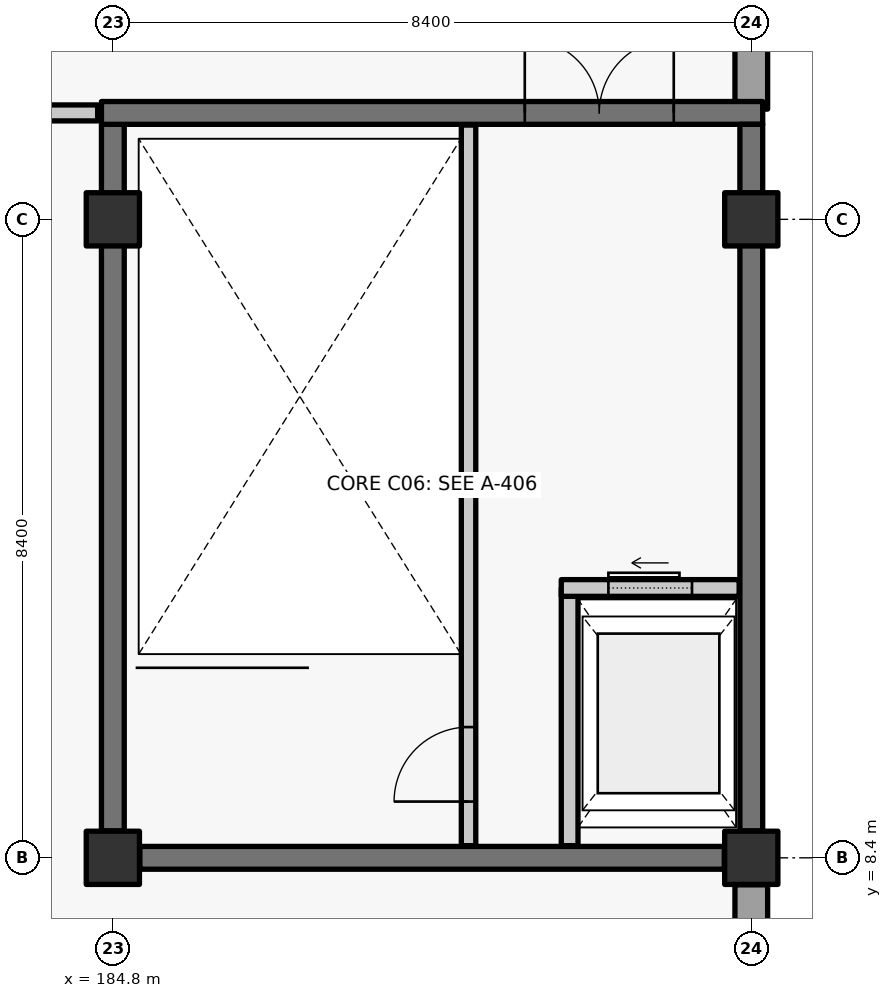
"""IFC4 building model, lengths in metres.
Left out: names, types, materials, properties, quantities, classifications, styles, units other than length and angle.
Written with IfcOpenShell. Run it as: python <this file> out.ifc"""

import sys

from ifc_helpers import new_model, si_unit, direction, frame, frame_2d, origin, origin_2d, place, context, subcontext, project, spatial, rectangle, extrude, element, fill, save


model = new_model("IFC4")
c1 = context("Model", 3, precision=1e-05, world=origin(), true_north=direction((0.0, 1.0)))
c2 = subcontext(c1, "Body", "Model", "MODEL_VIEW")
j1 = project(units=[si_unit("LENGTHUNIT", "METRE"), si_unit("PLANEANGLEUNIT", "RADIAN")], contexts=[c1])
p1 = place(None, origin())
s1 = spatial("IfcSite", under=j1, at=p1, CompositionType="ELEMENT")
p2 = place(p1, origin())
s2 = spatial("IfcBuilding", under=s1, at=p2, CompositionType="ELEMENT")
p3 = place(p2, frame((0.0, 0.0, 11.4)))
s3 = spatial("IfcBuildingStorey", under=s2, at=p3, CompositionType="ELEMENT", Elevation=11.4)
for number, where, z_axis, x_axis in (
    (1, (184.8, 8.4, 0.0), (0.0, 0.0, 1.0), (1.0, 0.0, 0.0)),
    (2, (184.8, 16.8, 0.0), (0.0, 0.0, 1.0), (1.0, 0.0, 0.0)),
    (3, (193.2, 8.4, 0.0), (0.0, 0.0, 1.0), (1.0, 0.0, 0.0)),
    (4, (193.2, 16.8, 0.0), (0.0, 0.0, 1.0), (1.0, 0.0, 0.0)),
):
    element("IfcColumn", number, at=place(p3, frame(where, z_axis=z_axis, x_axis=x_axis)), inside=s3, PredefinedType="COLUMN", context=c2, shape_type="SweptSolid", body=[
        extrude(rectangle(XDim=0.7, YDim=0.7, at=origin_2d()), origin(), (0.0, 0.0, 1.0), 4.8),
    ])
p4 = place(p3, frame((193.2, 8.045, 0.0), z_axis=(0.0, 0.0, 1.0), x_axis=(0.0, -1.0, 0.0)))
e5 = element("IfcWall", 5, at=p4, inside=s3, PredefinedType="SOLIDWALL", context=c2, shape_type="SweptSolid", body=[
    extrude(rectangle(XDim=7.69, YDim=0.43, at=frame_2d((3.845, 0.0))), origin(), (0.0, 0.0, 1.0), 4.55),
])
p5 = place(p4, frame((2.945, 0.0, 1.0)))
e6 = element("IfcOpeningElement", 6, at=p5, cuts=e5, PredefinedType="OPENING", context=c2, shape_type="SweptSolid", body=[
    extrude(rectangle(XDim=1.8, YDim=1.65, at=frame_2d((0.9, 0.825))), frame((0.0, 0.225, 0.0), z_axis=(0.0, -1.0, 0.0), x_axis=(1.0, 0.0, 0.0)), (0.0, 0.0, 1.0), 0.45),
])
p6 = place(p3, frame((193.2, 24.845, 0.0), z_axis=(0.0, 0.0, 1.0), x_axis=(0.0, -1.0, 0.0)))
e7 = element("IfcWall", 7, at=p6, inside=s3, PredefinedType="SOLIDWALL", context=c2, shape_type="SweptSolid", body=[
    extrude(rectangle(XDim=6.595, YDim=0.43, at=frame_2d((3.297, 0.0))), origin(), (0.0, 0.0, 1.0), 4.55),
])
p7 = place(p6, frame((2.445, 0.0, 1.0)))
e8 = element("IfcOpeningElement", 8, at=p7, cuts=e7, PredefinedType="OPENING", context=c2, shape_type="SweptSolid", body=[
    extrude(rectangle(XDim=1.8, YDim=1.65, at=frame_2d((0.9, 0.825))), frame((0.0, 0.225, 0.0), z_axis=(0.0, -1.0, 0.0), x_axis=(1.0, 0.0, 0.0)), (0.0, 0.0, 1.0), 0.45),
])
p8 = place(p3, frame((192.845, 8.4, 0.0), z_axis=(0.0, 0.0, 1.0), x_axis=(-1.0, 0.0, 0.0)))
e9 = element("IfcWall", 9, at=p8, inside=s3, PredefinedType="SHEAR", context=c2, shape_type="SweptSolid", body=[
    extrude(rectangle(XDim=7.69, YDim=0.3, at=frame_2d((3.845, 0.0))), origin(), (0.0, 0.0, 1.0), 4.52),
])
p9 = place(p3, frame((184.8, 8.755, 0.0), z_axis=(0.0, 0.0, 1.0), x_axis=(0.0, 1.0, 0.0)))
e10 = element("IfcWall", 10, at=p9, inside=s3, PredefinedType="SHEAR", context=c2, shape_type="SweptSolid", body=[
    extrude(rectangle(XDim=9.295, YDim=0.3, at=frame_2d((4.647, 0.0))), origin(), (0.0, 0.0, 1.0), 4.52),
])
p10 = place(p3, frame((184.65, 18.2, 0.0), z_axis=(0.0, 0.0, 1.0), x_axis=(1.0, 0.0, 0.0)))
e11 = element("IfcWall", 11, at=p10, inside=s3, PredefinedType="SHEAR", context=c2, shape_type="SweptSolid", body=[
    extrude(rectangle(XDim=8.7, YDim=0.3, at=frame_2d((4.35, 0.0))), origin(), (0.0, 0.0, 1.0), 4.52),
])
p11 = place(p10, frame((5.57, 0.0, 0.0)))
e12 = element("IfcOpeningElement", 12, at=p11, cuts=e11, PredefinedType="OPENING", context=c2, shape_type="SweptSolid", body=[
    extrude(rectangle(XDim=1.96, YDim=2.2, at=frame_2d((0.98, 1.1))), frame((0.0, 0.16, 0.0), z_axis=(0.0, -1.0, 0.0), x_axis=(1.0, 0.0, 0.0)), (0.0, 0.0, 1.0), 0.32),
])
p12 = place(p3, frame((193.2, 18.05, 0.0), z_axis=(0.0, 0.0, 1.0), x_axis=(0.0, -1.0, 0.0)))
e13 = element("IfcWall", 13, at=p12, inside=s3, PredefinedType="SHEAR", context=c2, shape_type="SweptSolid", body=[
    extrude(rectangle(XDim=9.295, YDim=0.3, at=frame_2d((4.647, 0.0))), origin(), (0.0, 0.0, 1.0), 4.52),
])
p13 = place(p3, frame((189.48, 8.56, 0.0), z_axis=(0.0, 0.0, 1.0), x_axis=(0.0, 1.0, 0.0)))
e14 = element("IfcWall", 14, at=p13, inside=s3, PredefinedType="SOLIDWALL", context=c2, shape_type="SweptSolid", body=[
    extrude(rectangle(XDim=9.48, YDim=0.19, at=frame_2d((4.74, 0.0))), origin(), (0.0, 0.0, 1.0), 4.52),
])
p14 = place(p13, frame((0.58, 0.0, 0.0)))
e15 = element("IfcOpeningElement", 15, at=p14, cuts=e14, PredefinedType="OPENING", context=c2, shape_type="SweptSolid", body=[
    extrude(rectangle(XDim=0.98, YDim=2.15, at=frame_2d((0.49, 1.075))), frame((0.0, 0.105, 0.0), z_axis=(0.0, -1.0, 0.0), x_axis=(1.0, 0.0, 0.0)), (0.0, 0.0, 1.0), 0.21),
])
p15 = place(p3, frame((190.81, 8.56, 0.0), z_axis=(0.0, 0.0, 1.0), x_axis=(0.0, 1.0, 0.0)))
e16 = element("IfcWall", 16, at=p15, inside=s3, PredefinedType="SOLIDWALL", context=c2, shape_type="SweptSolid", body=[
    extrude(rectangle(XDim=3.39, YDim=0.22, at=frame_2d((1.695, 0.0))), origin(), (0.0, 0.0, 1.0), 4.52),
])
p16 = place(p3, frame((190.7, 11.95, 0.0), z_axis=(0.0, 0.0, 1.0), x_axis=(1.0, 0.0, 0.0)))
e17 = element("IfcWall", 17, at=p16, inside=s3, PredefinedType="SOLIDWALL", context=c2, shape_type="SweptSolid", body=[
    extrude(rectangle(XDim=2.34, YDim=0.22, at=frame_2d((1.17, 0.0))), origin(), (0.0, 0.0, 1.0), 4.52),
])
p17 = place(p16, frame((0.62, 0.0, 0.0)))
e18 = element("IfcOpeningElement", 18, at=p17, cuts=e17, PredefinedType="OPENING", context=c2, shape_type="SweptSolid", body=[
    extrude(rectangle(XDim=1.1, YDim=2.2, at=frame_2d((0.55, 1.1))), frame((0.0, 0.12, 0.0), z_axis=(0.0, -1.0, 0.0), x_axis=(1.0, 0.0, 0.0)), (0.0, 0.0, 1.0), 0.24),
])
p18 = place(p3, frame((151.4, 18.2, 0.0), z_axis=(0.0, 0.0, 1.0), x_axis=(1.0, 0.0, 0.0)))
e19 = element("IfcWall", 19, at=p18, inside=s3, PredefinedType="PARTITIONING", context=c2, shape_type="SweptSolid", body=[
    extrude(rectangle(XDim=33.2, YDim=0.21, at=frame_2d((16.6, 0.0))), origin(), (0.0, 0.0, 1.0), 4.55),
])
p19 = place(p18, frame((3.5, 0.0, 0.0)))
e20 = element("IfcOpeningElement", 20, at=p19, cuts=e19, PredefinedType="OPENING", context=c2, shape_type="SweptSolid", body=[
    extrude(rectangle(XDim=1.0, YDim=2.15, at=frame_2d((0.5, 1.075))), frame((0.0, 0.115, 0.0), z_axis=(0.0, -1.0, 0.0), x_axis=(1.0, 0.0, 0.0)), (0.0, 0.0, 1.0), 0.23),
])
p20 = place(p18, frame((28.7, 0.0, 0.0)))
e21 = element("IfcOpeningElement", 21, at=p20, cuts=e19, PredefinedType="OPENING", context=c2, shape_type="SweptSolid", body=[
    extrude(rectangle(XDim=1.0, YDim=2.15, at=frame_2d((0.5, 1.075))), frame((0.0, 0.115, 0.0), z_axis=(0.0, -1.0, 0.0), x_axis=(1.0, 0.0, 0.0)), (0.0, 0.0, 1.0), 0.23),
])
p21 = place(p14, origin())
e22 = element("IfcDoor", 22, at=p21, inside=s3, OperationType="SINGLE_SWING_LEFT", PredefinedType="DOOR", context=c2, shape_type="SweptSolid", body=[
    extrude(rectangle(XDim=0.98, YDim=2.15, at=frame_2d((0.49, 1.075))), frame((0.0, 0.025, 0.0), z_axis=(0.0, -1.0, 0.0), x_axis=(1.0, 0.0, 0.0)), (0.0, 0.0, 1.0), 0.05),
])
fill(e15, e22)
p22 = place(p11, origin())
e23 = element("IfcDoor", 23, at=p22, inside=s3, OperationType="DOUBLE_DOOR_SINGLE_SWING", PredefinedType="DOOR", context=c2, shape_type="SweptSolid", body=[
    extrude(rectangle(XDim=1.96, YDim=2.2, at=frame_2d((0.98, 1.1))), frame((0.0, 0.025, 0.0), z_axis=(0.0, -1.0, 0.0), x_axis=(1.0, 0.0, 0.0)), (0.0, 0.0, 1.0), 0.05),
])
fill(e12, e23)
p23 = place(p17, origin())
e24 = element("IfcDoor", 24, at=p23, inside=s3, OperationType="SLIDING_TO_LEFT", PredefinedType="DOOR", context=c2, shape_type="SweptSolid", body=[
    extrude(rectangle(XDim=1.1, YDim=2.2, at=frame_2d((0.55, 1.1))), frame((0.0, 0.025, 0.0), z_axis=(0.0, -1.0, 0.0), x_axis=(1.0, 0.0, 0.0)), (0.0, 0.0, 1.0), 0.05),
])
fill(e18, e24)
save(model, sys.argv[1])
